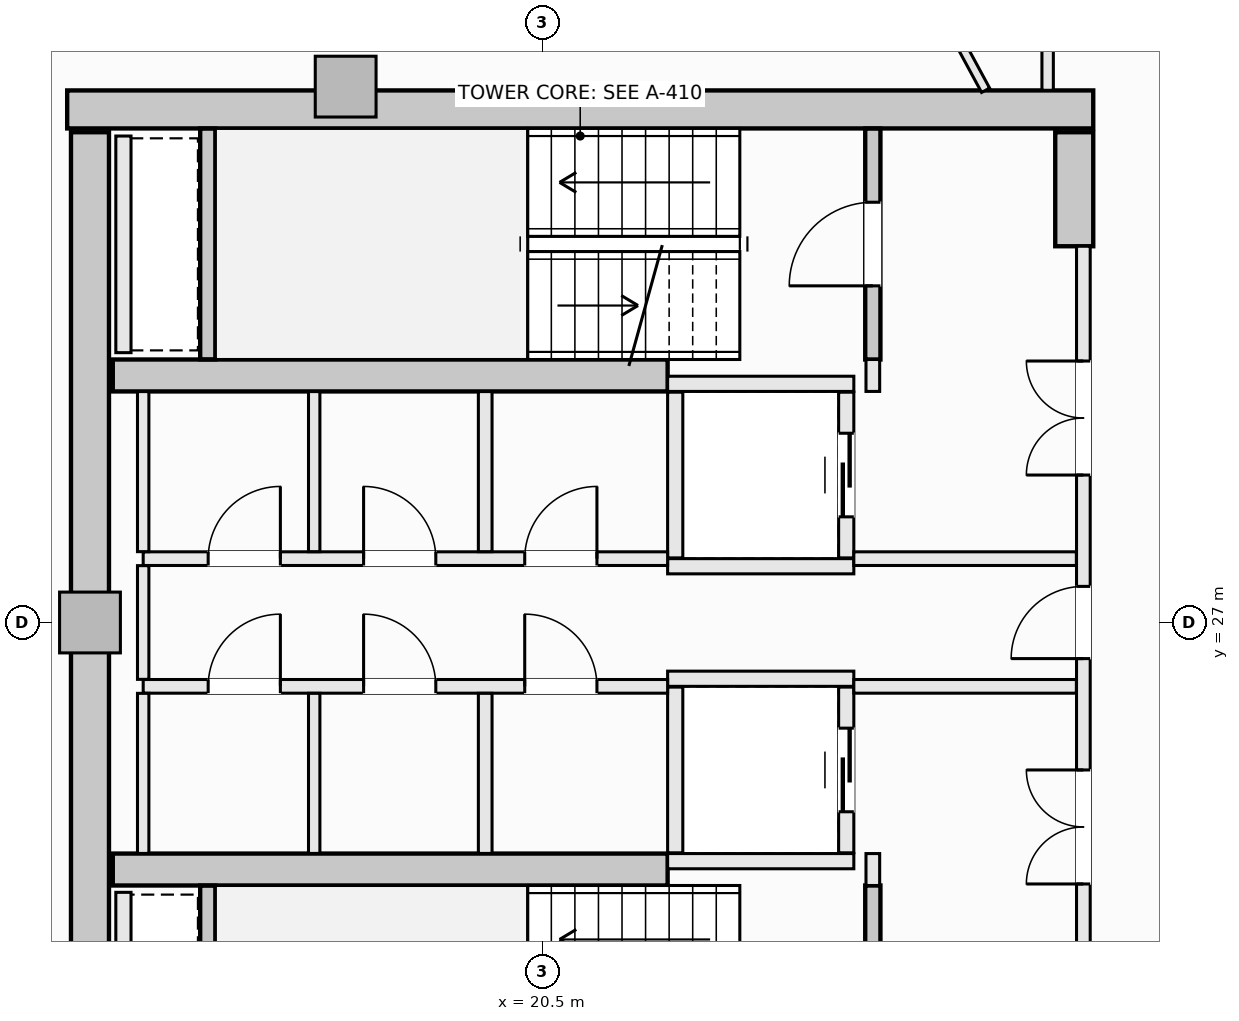
"""IFC4 building model, lengths in metres.
Left out: names, types, materials, properties, quantities, classifications, styles, units other than length and angle.
Written with IfcOpenShell. Run it as: python <this file> out.ifc"""

import sys

from ifc_helpers import new_model, si_unit, direction, frame, frame_2d, origin, origin_2d, place, context, subcontext, project, spatial, rectangle, extrude, element, fill, save


model = new_model("IFC4")
c1 = context("Model", 3, precision=1e-05, world=origin(), true_north=direction((0.0, 1.0)))
c2 = subcontext(c1, "Body", "Model", "MODEL_VIEW")
j1 = project(units=[si_unit("LENGTHUNIT", "METRE"), si_unit("PLANEANGLEUNIT", "RADIAN")], contexts=[c1])
p1 = place(None, origin())
s1 = spatial("IfcSite", under=j1, at=p1, CompositionType="ELEMENT")
p2 = place(p1, origin())
s2 = spatial("IfcBuilding", under=s1, at=p2, CompositionType="ELEMENT")
p3 = place(p2, frame((0.0, 0.0, 229.4)))
s3 = spatial("IfcBuildingStorey", under=s2, at=p3, CompositionType="ELEMENT", Elevation=229.4)
p4 = place(p3, frame((14.25, 33.75, -0.27), z_axis=(0.0, 0.0, 1.0), x_axis=(1.0, 0.0, 0.0)))
e1 = element("IfcWall", 1, at=p4, inside=s3, PredefinedType="SHEAR", context=c2, shape_type="SweptSolid", body=[
    extrude(rectangle(XDim=13.5, YDim=0.5, at=frame_2d((6.75, 0.0))), origin(), (0.0, 0.0, 1.0), 3.3),
])
p5 = place(p3, frame((14.55, 20.55, -0.27), z_axis=(0.0, 0.0, 1.0), x_axis=(0.0, 1.0, 0.0)))
e2 = element("IfcWall", 2, at=p5, inside=s3, PredefinedType="SHEAR", context=c2, shape_type="SweptSolid", body=[
    extrude(rectangle(XDim=12.9, YDim=0.5, at=frame_2d((6.45, 0.0))), origin(), (0.0, 0.0, 1.0), 3.3),
])
p6 = place(p3, frame((27.5, 31.95, -0.27), z_axis=(0.0, 0.0, 1.0), x_axis=(0.0, 1.0, 0.0)))
e3 = element("IfcWall", 3, at=p6, inside=s3, PredefinedType="SHEAR", context=c2, shape_type="SweptSolid", body=[
    extrude(rectangle(XDim=1.5, YDim=0.5, at=frame_2d((0.75, 0.0))), origin(), (0.0, 0.0, 1.0), 3.3),
])
for number, where, z_axis, x_axis in (
    (4, (14.85, 30.25, -0.27), (0.0, 0.0, 1.0), (1.0, 0.0, 0.0)),
    (5, (14.85, 23.75, -0.27), (0.0, 0.0, 1.0), (1.0, 0.0, 0.0)),
):
    element("IfcWall", number, at=place(p3, frame(where, z_axis=z_axis, x_axis=x_axis)), inside=s3, PredefinedType="SHEAR", context=c2, shape_type="SweptSolid", body=[
        extrude(rectangle(XDim=7.3, YDim=0.42, at=frame_2d((3.65, 0.0))), origin(), (0.0, 0.0, 1.0), 3.3),
    ])
for number, where, z_axis, x_axis in (
    (6, (17.914, 34.05, -0.27), (0.0, 0.0, 1.0), (1.0, 0.0, 0.0)),
    (7, (14.55, 27.0, -0.27), (0.0, 0.0, 1.0), (1.0, 0.0, 0.0)),
):
    element("IfcColumn", number, at=place(p3, frame(where, z_axis=z_axis, x_axis=x_axis)), inside=s3, PredefinedType="PILASTER", context=c2, shape_type="SweptSolid", body=[
        extrude(rectangle(XDim=0.8, YDim=0.8, at=origin_2d()), origin(), (0.0, 0.0, 1.0), 3.3),
    ])
p7 = place(p3, frame((24.85, 30.46, -0.27), z_axis=(0.0, 0.0, 1.0), x_axis=(0.0, 1.0, 0.0)))
e8 = element("IfcWall", 8, at=p7, inside=s3, PredefinedType="SHEAR", context=c2, shape_type="SweptSolid", body=[
    extrude(rectangle(XDim=3.038, YDim=0.2, at=frame_2d((1.519, 0.0))), origin(), (0.0, 0.0, 1.0), 3.3),
])
p8 = place(p7, frame((0.969, 0.0, 0.27)))
e9 = element("IfcOpeningElement", 9, at=p8, cuts=e8, PredefinedType="OPENING", context=c2, shape_type="SweptSolid", body=[
    extrude(rectangle(XDim=1.1, YDim=2.15, at=frame_2d((0.55, 1.075))), frame((0.0, 0.11, 0.0), z_axis=(0.0, -1.0, 0.0), x_axis=(1.0, 0.0, 0.0)), (0.0, 0.0, 1.0), 0.22),
])
p9 = place(p3, frame((16.1, 30.462, -0.27), z_axis=(0.0, 0.0, 1.0), x_axis=(0.0, 1.0, 0.0)))
e10 = element("IfcWall", 10, at=p9, inside=s3, PredefinedType="SHEAR", context=c2, shape_type="SweptSolid", body=[
    extrude(rectangle(XDim=3.036, YDim=0.2, at=frame_2d((1.518, 0.0))), origin(), (0.0, 0.0, 1.0), 3.3),
])
p10 = place(p3, frame((24.85, 20.502, -0.27), z_axis=(0.0, 0.0, 1.0), x_axis=(0.0, 1.0, 0.0)))
e11 = element("IfcWall", 11, at=p10, inside=s3, PredefinedType="SHEAR", context=c2, shape_type="SweptSolid", body=[
    extrude(rectangle(XDim=3.038, YDim=0.2, at=frame_2d((1.519, 0.0))), origin(), (0.0, 0.0, 1.0), 3.3),
])
p11 = place(p10, frame((0.969, 0.0, 0.27)))
e12 = element("IfcOpeningElement", 12, at=p11, cuts=e11, PredefinedType="OPENING", context=c2, shape_type="SweptSolid", body=[
    extrude(rectangle(XDim=1.1, YDim=2.15, at=frame_2d((0.55, 1.075))), frame((0.0, 0.11, 0.0), z_axis=(0.0, -1.0, 0.0), x_axis=(1.0, 0.0, 0.0)), (0.0, 0.0, 1.0), 0.22),
])
p12 = place(p3, frame((16.1, 20.502, -0.27), z_axis=(0.0, 0.0, 1.0), x_axis=(0.0, 1.0, 0.0)))
e13 = element("IfcWall", 13, at=p12, inside=s3, PredefinedType="SHEAR", context=c2, shape_type="SweptSolid", body=[
    extrude(rectangle(XDim=3.036, YDim=0.2, at=frame_2d((1.518, 0.0))), origin(), (0.0, 0.0, 1.0), 3.3),
])
for number, where, z_axis, x_axis in (
    (14, (22.15, 30.14, 0.0), (0.0, 0.0, 1.0), (1.0, 0.0, 0.0)),
    (15, (22.15, 27.74, 0.0), (0.0, 0.0, 1.0), (1.0, 0.0, 0.0)),
):
    element("IfcWall", number, at=place(p3, frame(where, z_axis=z_axis, x_axis=x_axis)), inside=s3, PredefinedType="SOLIDWALL", context=c2, shape_type="SweptSolid", body=[
        extrude(rectangle(XDim=2.45, YDim=0.2, at=frame_2d((1.225, 0.0))), origin(), (0.0, 0.0, 1.0), 3.03),
    ])
p13 = place(p3, frame((22.25, 27.85, 0.0), z_axis=(0.0, 0.0, 1.0), x_axis=(0.0, 1.0, 0.0)))
e16 = element("IfcWall", 16, at=p13, inside=s3, PredefinedType="SOLIDWALL", context=c2, shape_type="SweptSolid", body=[
    extrude(rectangle(XDim=2.18, YDim=0.2, at=frame_2d((1.09, 0.0))), origin(), (0.0, 0.0, 1.0), 3.03),
])
p14 = place(p3, frame((24.5, 27.85, 0.0), z_axis=(0.0, 0.0, 1.0), x_axis=(0.0, 1.0, 0.0)))
e17 = element("IfcWall", 17, at=p14, inside=s3, PredefinedType="SOLIDWALL", context=c2, shape_type="SweptSolid", body=[
    extrude(rectangle(XDim=2.18, YDim=0.2, at=frame_2d((1.09, 0.0))), origin(), (0.0, 0.0, 1.0), 3.03),
])
p15 = place(p14, frame((0.54, 0.0, 0.0)))
e18 = element("IfcOpeningElement", 18, at=p15, cuts=e17, PredefinedType="OPENING", context=c2, shape_type="SweptSolid", body=[
    extrude(rectangle(XDim=1.1, YDim=2.2, at=frame_2d((0.55, 1.1))), frame((0.0, 0.11, 0.0), z_axis=(0.0, -1.0, 0.0), x_axis=(1.0, 0.0, 0.0)), (0.0, 0.0, 1.0), 0.22),
])
for number, where, z_axis, x_axis in (
    (19, (22.15, 26.26, 0.0), (0.0, 0.0, 1.0), (1.0, 0.0, 0.0)),
    (20, (22.15, 23.86, 0.0), (0.0, 0.0, 1.0), (1.0, 0.0, 0.0)),
):
    element("IfcWall", number, at=place(p3, frame(where, z_axis=z_axis, x_axis=x_axis)), inside=s3, PredefinedType="SOLIDWALL", context=c2, shape_type="SweptSolid", body=[
        extrude(rectangle(XDim=2.45, YDim=0.2, at=frame_2d((1.225, 0.0))), origin(), (0.0, 0.0, 1.0), 3.03),
    ])
p16 = place(p3, frame((22.25, 23.97, 0.0), z_axis=(0.0, 0.0, 1.0), x_axis=(0.0, 1.0, 0.0)))
e21 = element("IfcWall", 21, at=p16, inside=s3, PredefinedType="SOLIDWALL", context=c2, shape_type="SweptSolid", body=[
    extrude(rectangle(XDim=2.18, YDim=0.2, at=frame_2d((1.09, 0.0))), origin(), (0.0, 0.0, 1.0), 3.03),
])
p17 = place(p3, frame((24.5, 23.97, 0.0), z_axis=(0.0, 0.0, 1.0), x_axis=(0.0, 1.0, 0.0)))
e22 = element("IfcWall", 22, at=p17, inside=s3, PredefinedType="SOLIDWALL", context=c2, shape_type="SweptSolid", body=[
    extrude(rectangle(XDim=2.18, YDim=0.2, at=frame_2d((1.09, 0.0))), origin(), (0.0, 0.0, 1.0), 3.03),
])
p18 = place(p17, frame((0.54, 0.0, 0.0)))
e23 = element("IfcOpeningElement", 23, at=p18, cuts=e22, PredefinedType="OPENING", context=c2, shape_type="SweptSolid", body=[
    extrude(rectangle(XDim=1.1, YDim=2.2, at=frame_2d((0.55, 1.1))), frame((0.0, 0.11, 0.0), z_axis=(0.0, -1.0, 0.0), x_axis=(1.0, 0.0, 0.0)), (0.0, 0.0, 1.0), 0.22),
])
for number, where, z_axis, x_axis in (
    (24, (14.99, 30.55, 0.0), (0.0, 0.0, 1.0), (0.0, 1.0, 0.0)),
    (25, (14.99, 20.6, 0.0), (0.0, 0.0, 1.0), (0.0, 1.0, 0.0)),
):
    element("IfcWall", number, at=place(p3, frame(where, z_axis=z_axis, x_axis=x_axis)), inside=s3, PredefinedType="SOLIDWALL", context=c2, shape_type="SweptSolid", body=[
        extrude(rectangle(XDim=2.85, YDim=0.2, at=frame_2d((1.425, 0.0))), origin(), (0.0, 0.0, 1.0), 3.03),
    ])
for number, where, z_axis, x_axis in (
    (26, (24.85, 23.54, 0.0), (0.0, 0.0, 1.0), (0.0, 1.0, 0.0)),
    (27, (24.85, 30.04, 0.0), (0.0, 0.0, 1.0), (0.0, 1.0, 0.0)),
):
    element("IfcWall", number, at=place(p3, frame(where, z_axis=z_axis, x_axis=x_axis)), inside=s3, PredefinedType="SOLIDWALL", context=c2, shape_type="SweptSolid", body=[
        extrude(rectangle(XDim=0.42, YDim=0.18, at=frame_2d((0.21, 0.0))), origin(), (0.0, 0.0, 1.0), 3.03),
    ])
p19 = place(p3, frame((27.62, 22.05, 0.0), z_axis=(0.0, 0.0, 1.0), x_axis=(0.0, 1.0, 0.0)))
e28 = element("IfcWall", 28, at=p19, inside=s3, PredefinedType="SOLIDWALL", context=c2, shape_type="SweptSolid", body=[
    extrude(rectangle(XDim=9.9, YDim=0.18, at=frame_2d((4.95, 0.0))), origin(), (0.0, 0.0, 1.0), 3.03),
])
p20 = place(p19, frame((4.475, 0.0, 0.0)))
e29 = element("IfcOpeningElement", 29, at=p20, cuts=e28, PredefinedType="OPENING", context=c2, shape_type="SweptSolid", body=[
    extrude(rectangle(XDim=0.95, YDim=2.1, at=frame_2d((0.475, 1.05))), frame((0.0, 0.1, 0.0), z_axis=(0.0, -1.0, 0.0), x_axis=(1.0, 0.0, 0.0)), (0.0, 0.0, 1.0), 0.2),
])
p21 = place(p19, frame((6.89, 0.0, 0.0)))
e30 = element("IfcOpeningElement", 30, at=p21, cuts=e28, PredefinedType="OPENING", context=c2, shape_type="SweptSolid", body=[
    extrude(rectangle(XDim=1.5, YDim=2.2, at=frame_2d((0.75, 1.1))), frame((0.0, 0.1, 0.0), z_axis=(0.0, -1.0, 0.0), x_axis=(1.0, 0.0, 0.0)), (0.0, 0.0, 1.0), 0.2),
])
p22 = place(p19, frame((1.51, 0.0, 0.0)))
e31 = element("IfcOpeningElement", 31, at=p22, cuts=e28, PredefinedType="OPENING", context=c2, shape_type="SweptSolid", body=[
    extrude(rectangle(XDim=1.5, YDim=2.2, at=frame_2d((0.75, 1.1))), frame((0.0, 0.1, 0.0), z_axis=(0.0, -1.0, 0.0), x_axis=(1.0, 0.0, 0.0)), (0.0, 0.0, 1.0), 0.2),
])
p23 = place(p3, frame((15.25, 27.84, 0.0), z_axis=(0.0, 0.0, 1.0), x_axis=(1.0, 0.0, 0.0)))
e32 = element("IfcWall", 32, at=p23, inside=s3, PredefinedType="SOLIDWALL", context=c2, shape_type="SweptSolid", body=[
    extrude(rectangle(XDim=6.9, YDim=0.18, at=frame_2d((3.45, 0.0))), origin(), (0.0, 0.0, 1.0), 3.03),
])
p24 = place(p23, frame((5.02, 0.0, 0.0)))
e33 = element("IfcOpeningElement", 33, at=p24, cuts=e32, PredefinedType="OPENING", context=c2, shape_type="SweptSolid", body=[
    extrude(rectangle(XDim=0.95, YDim=2.1, at=frame_2d((0.475, 1.05))), frame((0.0, 0.1, 0.0), z_axis=(0.0, -1.0, 0.0), x_axis=(1.0, 0.0, 0.0)), (0.0, 0.0, 1.0), 0.2),
])
p25 = place(p23, frame((0.855, 0.0, 0.0)))
e34 = element("IfcOpeningElement", 34, at=p25, cuts=e32, PredefinedType="OPENING", context=c2, shape_type="SweptSolid", body=[
    extrude(rectangle(XDim=0.95, YDim=2.1, at=frame_2d((0.475, 1.05))), frame((0.0, 0.1, 0.0), z_axis=(0.0, -1.0, 0.0), x_axis=(1.0, 0.0, 0.0)), (0.0, 0.0, 1.0), 0.2),
])
p26 = place(p23, frame((2.9, 0.0, 0.0)))
e35 = element("IfcOpeningElement", 35, at=p26, cuts=e32, PredefinedType="OPENING", context=c2, shape_type="SweptSolid", body=[
    extrude(rectangle(XDim=0.95, YDim=2.1, at=frame_2d((0.475, 1.05))), frame((0.0, 0.1, 0.0), z_axis=(0.0, -1.0, 0.0), x_axis=(1.0, 0.0, 0.0)), (0.0, 0.0, 1.0), 0.2),
])
p27 = place(p3, frame((24.6, 27.84, 0.0), z_axis=(0.0, 0.0, 1.0), x_axis=(1.0, 0.0, 0.0)))
e36 = element("IfcWall", 36, at=p27, inside=s3, PredefinedType="SOLIDWALL", context=c2, shape_type="SweptSolid", body=[
    extrude(rectangle(XDim=2.928, YDim=0.18, at=frame_2d((1.464, 0.0))), origin(), (0.0, 0.0, 1.0), 3.03),
])
p28 = place(p3, frame((15.25, 26.16, 0.0), z_axis=(0.0, 0.0, 1.0), x_axis=(1.0, 0.0, 0.0)))
e37 = element("IfcWall", 37, at=p28, inside=s3, PredefinedType="SOLIDWALL", context=c2, shape_type="SweptSolid", body=[
    extrude(rectangle(XDim=6.9, YDim=0.18, at=frame_2d((3.45, 0.0))), origin(), (0.0, 0.0, 1.0), 3.03),
])
p29 = place(p28, frame((5.02, 0.0, 0.0)))
e38 = element("IfcOpeningElement", 38, at=p29, cuts=e37, PredefinedType="OPENING", context=c2, shape_type="SweptSolid", body=[
    extrude(rectangle(XDim=0.95, YDim=2.1, at=frame_2d((0.475, 1.05))), frame((0.0, 0.1, 0.0), z_axis=(0.0, -1.0, 0.0), x_axis=(1.0, 0.0, 0.0)), (0.0, 0.0, 1.0), 0.2),
])
p30 = place(p28, frame((0.855, 0.0, 0.0)))
e39 = element("IfcOpeningElement", 39, at=p30, cuts=e37, PredefinedType="OPENING", context=c2, shape_type="SweptSolid", body=[
    extrude(rectangle(XDim=0.95, YDim=2.1, at=frame_2d((0.475, 1.05))), frame((0.0, 0.1, 0.0), z_axis=(0.0, -1.0, 0.0), x_axis=(1.0, 0.0, 0.0)), (0.0, 0.0, 1.0), 0.2),
])
p31 = place(p28, frame((2.9, 0.0, 0.0)))
e40 = element("IfcOpeningElement", 40, at=p31, cuts=e37, PredefinedType="OPENING", context=c2, shape_type="SweptSolid", body=[
    extrude(rectangle(XDim=0.95, YDim=2.1, at=frame_2d((0.475, 1.05))), frame((0.0, 0.1, 0.0), z_axis=(0.0, -1.0, 0.0), x_axis=(1.0, 0.0, 0.0)), (0.0, 0.0, 1.0), 0.2),
])
p32 = place(p3, frame((24.6, 26.16, 0.0), z_axis=(0.0, 0.0, 1.0), x_axis=(1.0, 0.0, 0.0)))
e41 = element("IfcWall", 41, at=p32, inside=s3, PredefinedType="SOLIDWALL", context=c2, shape_type="SweptSolid", body=[
    extrude(rectangle(XDim=2.928, YDim=0.18, at=frame_2d((1.464, 0.0))), origin(), (0.0, 0.0, 1.0), 3.03),
])
p33 = place(p3, frame((15.25, 23.962, 0.0), z_axis=(0.0, 0.0, 1.0), x_axis=(0.0, 1.0, 0.0)))
e42 = element("IfcWall", 42, at=p33, inside=s3, PredefinedType="PARTITIONING", context=c2, shape_type="SweptSolid", body=[
    extrude(rectangle(XDim=2.106, YDim=0.15, at=frame_2d((1.053, 0.0))), origin(), (0.0, 0.0, 1.0), 3.03),
])
p34 = place(p3, frame((15.25, 26.252, 0.0), z_axis=(0.0, 0.0, 1.0), x_axis=(0.0, 1.0, 0.0)))
e43 = element("IfcWall", 43, at=p34, inside=s3, PredefinedType="PARTITIONING", context=c2, shape_type="SweptSolid", body=[
    extrude(rectangle(XDim=1.496, YDim=0.15, at=frame_2d((0.748, 0.0))), origin(), (0.0, 0.0, 1.0), 3.03),
])
p35 = place(p3, frame((15.25, 27.932, 0.0), z_axis=(0.0, 0.0, 1.0), x_axis=(0.0, 1.0, 0.0)))
e44 = element("IfcWall", 44, at=p35, inside=s3, PredefinedType="PARTITIONING", context=c2, shape_type="SweptSolid", body=[
    extrude(rectangle(XDim=2.106, YDim=0.15, at=frame_2d((1.053, 0.0))), origin(), (0.0, 0.0, 1.0), 3.03),
])
for number, where, z_axis, x_axis in (
    (45, (19.75, 23.962, 0.0), (0.0, 0.0, 1.0), (0.0, 1.0, 0.0)),
    (46, (19.75, 27.932, 0.0), (0.0, 0.0, 1.0), (0.0, 1.0, 0.0)),
):
    element("IfcWall", number, at=place(p3, frame(where, z_axis=z_axis, x_axis=x_axis)), inside=s3, PredefinedType="SOLIDWALL", context=c2, shape_type="SweptSolid", body=[
        extrude(rectangle(XDim=2.106, YDim=0.18, at=frame_2d((1.053, 0.0))), origin(), (0.0, 0.0, 1.0), 3.03),
    ])
for number, where, z_axis, x_axis in (
    (47, (17.5, 23.962, 0.0), (0.0, 0.0, 1.0), (0.0, 1.0, 0.0)),
    (48, (17.5, 27.932, 0.0), (0.0, 0.0, 1.0), (0.0, 1.0, 0.0)),
):
    element("IfcWall", number, at=place(p3, frame(where, z_axis=z_axis, x_axis=x_axis)), inside=s3, PredefinedType="PARTITIONING", context=c2, shape_type="SweptSolid", body=[
        extrude(rectangle(XDim=2.106, YDim=0.15, at=frame_2d((1.053, 0.0))), origin(), (0.0, 0.0, 1.0), 3.03),
    ])
p36 = place(p3, frame((27.15, 34.002, 0.0), z_axis=(0.0, 0.0, 1.0), x_axis=(0.0, 1.0, 0.0)))
e49 = element("IfcWall", 49, at=p36, inside=s3, PredefinedType="PARTITIONING", context=c2, shape_type="SweptSolid", body=[
    extrude(rectangle(XDim=4.198, YDim=0.15, at=frame_2d((2.099, 0.0))), origin(), (0.0, 0.0, 1.0), 3.03),
])
p37 = place(p36, frame((1.998, 0.0, 0.0)))
e50 = element("IfcOpeningElement", 50, at=p37, cuts=e49, PredefinedType="OPENING", context=c2, shape_type="SweptSolid", body=[
    extrude(rectangle(XDim=0.95, YDim=2.1, at=frame_2d((0.475, 1.05))), frame((0.0, 0.085, 0.0), z_axis=(0.0, -1.0, 0.0), x_axis=(1.0, 0.0, 0.0)), (0.0, 0.0, 1.0), 0.17),
])
p38 = place(p3, frame((25.749, 35.083, 0.0), z_axis=(0.0, 0.0, 1.0), x_axis=(0.476052805352, -0.879416696746, 0.0)))
e51 = element("IfcWall", 51, at=p38, inside=s3, PredefinedType="PARTITIONING", context=c2, shape_type="SweptSolid", body=[
    extrude(rectangle(XDim=1.229, YDim=0.12, at=frame_2d((0.615, 0.0))), origin(), (0.0, 0.0, 1.0), 3.03),
])
p39 = place(p8, origin())
e52 = element("IfcDoor", 52, at=p39, inside=s3, OperationType="SINGLE_SWING_LEFT", PredefinedType="DOOR", context=c2, shape_type="SweptSolid", body=[
    extrude(rectangle(XDim=1.1, YDim=2.15, at=frame_2d((0.55, 1.075))), frame((0.0, 0.025, 0.0), z_axis=(0.0, -1.0, 0.0), x_axis=(1.0, 0.0, 0.0)), (0.0, 0.0, 1.0), 0.05),
])
fill(e9, e52)
p40 = place(p15, origin())
e53 = element("IfcDoor", 53, at=p40, inside=s3, OperationType="SLIDING_TO_LEFT", PredefinedType="DOOR", context=c2, shape_type="SweptSolid", body=[
    extrude(rectangle(XDim=1.1, YDim=2.2, at=frame_2d((0.55, 1.1))), frame((0.0, 0.025, 0.0), z_axis=(0.0, -1.0, 0.0), x_axis=(1.0, 0.0, 0.0)), (0.0, 0.0, 1.0), 0.05),
])
fill(e18, e53)
p41 = place(p18, origin())
e54 = element("IfcDoor", 54, at=p41, inside=s3, OperationType="SLIDING_TO_LEFT", PredefinedType="DOOR", context=c2, shape_type="SweptSolid", body=[
    extrude(rectangle(XDim=1.1, YDim=2.2, at=frame_2d((0.55, 1.1))), frame((0.0, 0.025, 0.0), z_axis=(0.0, -1.0, 0.0), x_axis=(1.0, 0.0, 0.0)), (0.0, 0.0, 1.0), 0.05),
])
fill(e23, e54)
p42 = place(p20, origin())
e55 = element("IfcDoor", 55, at=p42, inside=s3, OperationType="SINGLE_SWING_LEFT", PredefinedType="DOOR", context=c2, shape_type="SweptSolid", body=[
    extrude(rectangle(XDim=0.95, YDim=2.1, at=frame_2d((0.475, 1.05))), frame((0.0, 0.025, 0.0), z_axis=(0.0, -1.0, 0.0), x_axis=(1.0, 0.0, 0.0)), (0.0, 0.0, 1.0), 0.05),
])
fill(e29, e55)
p43 = place(p21, origin())
e56 = element("IfcDoor", 56, at=p43, inside=s3, OperationType="DOUBLE_DOOR_SINGLE_SWING", PredefinedType="DOOR", context=c2, shape_type="SweptSolid", body=[
    extrude(rectangle(XDim=1.5, YDim=2.2, at=frame_2d((0.75, 1.1))), frame((0.0, 0.025, 0.0), z_axis=(0.0, -1.0, 0.0), x_axis=(1.0, 0.0, 0.0)), (0.0, 0.0, 1.0), 0.05),
])
fill(e30, e56)
p44 = place(p22, origin())
e57 = element("IfcDoor", 57, at=p44, inside=s3, OperationType="DOUBLE_DOOR_SINGLE_SWING", PredefinedType="DOOR", context=c2, shape_type="SweptSolid", body=[
    extrude(rectangle(XDim=1.5, YDim=2.2, at=frame_2d((0.75, 1.1))), frame((0.0, 0.025, 0.0), z_axis=(0.0, -1.0, 0.0), x_axis=(1.0, 0.0, 0.0)), (0.0, 0.0, 1.0), 0.05),
])
fill(e31, e57)
p45 = place(p24, origin())
e58 = element("IfcDoor", 58, at=p45, inside=s3, OperationType="SINGLE_SWING_RIGHT", PredefinedType="DOOR", context=c2, shape_type="SweptSolid", body=[
    extrude(rectangle(XDim=0.95, YDim=2.1, at=frame_2d((0.475, 1.05))), frame((0.0, 0.025, 0.0), z_axis=(0.0, -1.0, 0.0), x_axis=(1.0, 0.0, 0.0)), (0.0, 0.0, 1.0), 0.05),
])
fill(e33, e58)
p46 = place(p29, origin())
e59 = element("IfcDoor", 59, at=p46, inside=s3, OperationType="SINGLE_SWING_LEFT", PredefinedType="DOOR", context=c2, shape_type="SweptSolid", body=[
    extrude(rectangle(XDim=0.95, YDim=2.1, at=frame_2d((0.475, 1.05))), frame((0.0, 0.025, 0.0), z_axis=(0.0, -1.0, 0.0), x_axis=(1.0, 0.0, 0.0)), (0.0, 0.0, 1.0), 0.05),
])
fill(e38, e59)
p47 = place(p25, origin())
e60 = element("IfcDoor", 60, at=p47, inside=s3, OperationType="SINGLE_SWING_RIGHT", PredefinedType="DOOR", context=c2, shape_type="SweptSolid", body=[
    extrude(rectangle(XDim=0.95, YDim=2.1, at=frame_2d((0.475, 1.05))), frame((0.0, 0.025, 0.0), z_axis=(0.0, -1.0, 0.0), x_axis=(1.0, 0.0, 0.0)), (0.0, 0.0, 1.0), 0.05),
])
fill(e34, e60)
p48 = place(p26, origin())
e61 = element("IfcDoor", 61, at=p48, inside=s3, OperationType="SINGLE_SWING_LEFT", PredefinedType="DOOR", context=c2, shape_type="SweptSolid", body=[
    extrude(rectangle(XDim=0.95, YDim=2.1, at=frame_2d((0.475, 1.05))), frame((0.0, 0.025, 0.0), z_axis=(0.0, -1.0, 0.0), x_axis=(1.0, 0.0, 0.0)), (0.0, 0.0, 1.0), 0.05),
])
fill(e35, e61)
p49 = place(p30, origin())
e62 = element("IfcDoor", 62, at=p49, inside=s3, OperationType="SINGLE_SWING_RIGHT", PredefinedType="DOOR", context=c2, shape_type="SweptSolid", body=[
    extrude(rectangle(XDim=0.95, YDim=2.1, at=frame_2d((0.475, 1.05))), frame((0.0, 0.025, 0.0), z_axis=(0.0, -1.0, 0.0), x_axis=(1.0, 0.0, 0.0)), (0.0, 0.0, 1.0), 0.05),
])
fill(e39, e62)
p50 = place(p31, origin())
e63 = element("IfcDoor", 63, at=p50, inside=s3, OperationType="SINGLE_SWING_LEFT", PredefinedType="DOOR", context=c2, shape_type="SweptSolid", body=[
    extrude(rectangle(XDim=0.95, YDim=2.1, at=frame_2d((0.475, 1.05))), frame((0.0, 0.025, 0.0), z_axis=(0.0, -1.0, 0.0), x_axis=(1.0, 0.0, 0.0)), (0.0, 0.0, 1.0), 0.05),
])
fill(e40, e63)
save(model, sys.argv[1])
